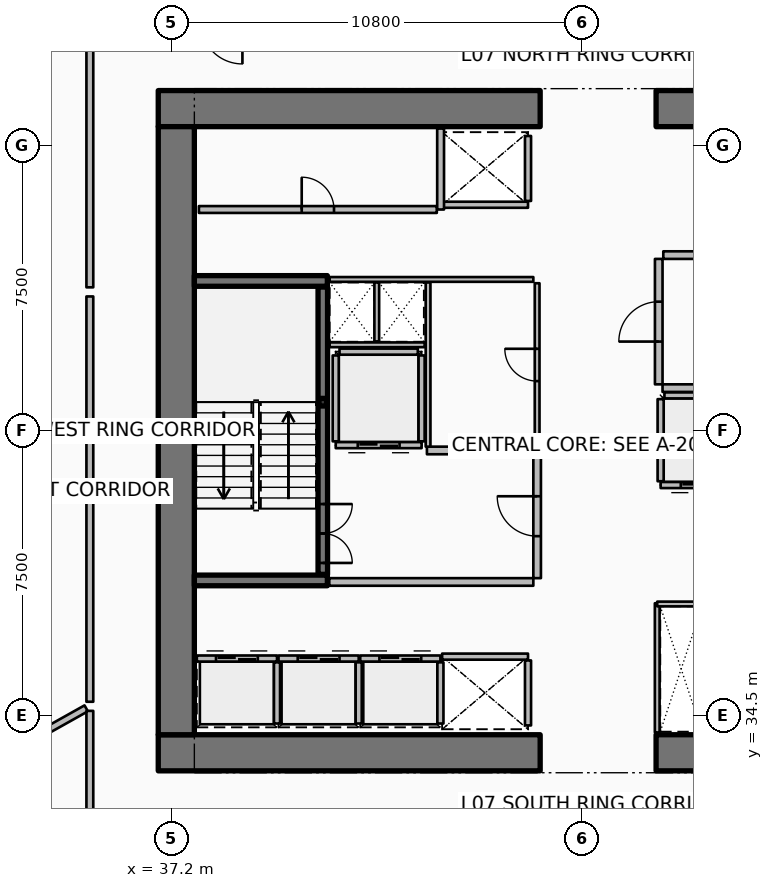
"""IFC4 building model, lengths in metres.
Left out: names, types, materials, properties, quantities, classifications, styles, units other than length and angle.
Written with IfcOpenShell. Run it as: python <this file> out.ifc"""

import sys

from ifc_helpers import new_model, si_unit, direction, frame, frame_2d, origin, origin_2d, place, context, subcontext, project, spatial, rectangle, hollow_rectangle, extrude, element, fill, save


model = new_model("IFC4")
c1 = context("Model", 3, precision=1e-05, world=origin(), true_north=direction((0.0, 1.0)))
c2 = subcontext(c1, "Body", "Model", "MODEL_VIEW")
j1 = project(units=[si_unit("LENGTHUNIT", "METRE"), si_unit("PLANEANGLEUNIT", "RADIAN")], contexts=[c1])
p1 = place(None, origin())
s1 = spatial("IfcSite", under=j1, at=p1, CompositionType="ELEMENT")
p2 = place(p1, origin())
s2 = spatial("IfcBuilding", under=s1, at=p2, CompositionType="ELEMENT")
p3 = place(p2, frame((0.0, 0.0, 33.9)))
s3 = spatial("IfcBuildingStorey", under=s2, at=p3, CompositionType="ELEMENT", Elevation=33.9)
p4 = place(p3, frame((36.85, 33.525, 0.0), z_axis=(0.0, 0.0, 1.0), x_axis=(1.0, 0.0, 0.0)))
e1 = element("IfcWall", 1, at=p4, inside=s3, PredefinedType="SHEAR", context=c2, shape_type="SweptSolid", body=[
    extrude(rectangle(XDim=10.05, YDim=0.95, at=frame_2d((5.025, 0.0))), origin(), (0.0, 0.0, 1.0), 3.75),
])
p5 = place(p3, frame((49.95, 33.525, 0.0), z_axis=(0.0, 0.0, 1.0), x_axis=(1.0, 0.0, 0.0)))
e2 = element("IfcWall", 2, at=p5, inside=s3, PredefinedType="SHEAR", context=c2, shape_type="SweptSolid", body=[
    extrude(rectangle(XDim=10.05, YDim=0.95, at=frame_2d((5.025, 0.0))), origin(), (0.0, 0.0, 1.0), 3.75),
])
p6 = place(p3, frame((36.85, 50.475, 0.0), z_axis=(0.0, 0.0, 1.0), x_axis=(1.0, 0.0, 0.0)))
e3 = element("IfcWall", 3, at=p6, inside=s3, PredefinedType="SHEAR", context=c2, shape_type="SweptSolid", body=[
    extrude(rectangle(XDim=10.05, YDim=0.95, at=frame_2d((5.025, 0.0))), origin(), (0.0, 0.0, 1.0), 3.75),
])
p7 = place(p3, frame((49.95, 50.475, 0.0), z_axis=(0.0, 0.0, 1.0), x_axis=(1.0, 0.0, 0.0)))
e4 = element("IfcWall", 4, at=p7, inside=s3, PredefinedType="SHEAR", context=c2, shape_type="SweptSolid", body=[
    extrude(rectangle(XDim=10.05, YDim=0.95, at=frame_2d((5.025, 0.0))), origin(), (0.0, 0.0, 1.0), 3.75),
])
p8 = place(p3, frame((37.325, 34.0, 0.0), z_axis=(0.0, 0.0, 1.0), x_axis=(0.0, 1.0, 0.0)))
e5 = element("IfcWall", 5, at=p8, inside=s3, PredefinedType="SHEAR", context=c2, shape_type="SweptSolid", body=[
    extrude(rectangle(XDim=16.0, YDim=0.95, at=frame_2d((8.0, 0.0))), origin(), (0.0, 0.0, 1.0), 3.75),
])
for number, where, z_axis, x_axis in (
    (6, (37.8, 38.06, 0.0), (0.0, 0.0, 1.0), (1.0, 0.0, 0.0)),
    (7, (37.8, 45.94, 0.0), (0.0, 0.0, 1.0), (1.0, 0.0, 0.0)),
):
    element("IfcWall", number, at=place(p3, frame(where, z_axis=z_axis, x_axis=x_axis)), inside=s3, PredefinedType="SHEAR", context=c2, shape_type="SweptSolid", body=[
        extrude(rectangle(XDim=3.5, YDim=0.28, at=frame_2d((1.75, 0.0))), origin(), (0.0, 0.0, 1.0), 3.75),
    ])
p9 = place(p3, frame((41.18, 42.75, 0.0), z_axis=(0.0, 0.0, 1.0), x_axis=(1.0, 0.0, 0.0)))
e8 = element("IfcColumn", 8, at=p9, inside=s3, PredefinedType="COLUMN", context=c2, shape_type="SweptSolid", body=[
    extrude(hollow_rectangle(XDim=0.2, YDim=0.2, WallThickness=0.01, InnerFilletRadius=0.01, OuterFilletRadius=0.02, at=origin_2d()), origin(), (0.0, 0.0, 1.0), 1.67),
])
p10 = place(p3, frame((41.18, 38.22, 0.0), z_axis=(0.0, 0.0, 1.0), x_axis=(0.0, 1.0, 0.0)))
e9 = element("IfcWall", 9, at=p10, inside=s3, PredefinedType="SOLIDWALL", context=c2, shape_type="SweptSolid", body=[
    extrude(rectangle(XDim=7.56, YDim=0.25, at=frame_2d((3.78, 0.0))), origin(), (0.0, 0.0, 1.0), 3.5),
])
p11 = place(p10, frame((0.3, 0.0, 0.0)))
e10 = element("IfcOpeningElement", 10, at=p11, cuts=e9, PredefinedType="OPENING", context=c2, shape_type="SweptSolid", body=[
    extrude(rectangle(XDim=1.55, YDim=2.15, at=frame_2d((0.775, 1.075))), frame((0.0, 0.135, 0.0), z_axis=(0.0, -1.0, 0.0), x_axis=(1.0, 0.0, 0.0)), (0.0, 0.0, 1.0), 0.27),
])
p12 = place(p3, frame((37.865, 36.005, 0.0), z_axis=(0.0, 0.0, 1.0), x_axis=(1.0, 0.0, 0.0)))
e11 = element("IfcWall", 11, at=p12, inside=s3, PredefinedType="PARTITIONING", context=c2, shape_type="SweptSolid", body=[
    extrude(rectangle(XDim=2.11, YDim=0.16, at=frame_2d((1.055, 0.0))), origin(), (0.0, 0.0, 1.0), 3.5),
])
p13 = place(p12, frame((0.505, 0.0, 0.0)))
e12 = element("IfcOpeningElement", 12, at=p13, cuts=e11, PredefinedType="OPENING", context=c2, shape_type="SweptSolid", body=[
    extrude(rectangle(XDim=1.1, YDim=2.1, at=frame_2d((0.55, 1.05))), frame((0.0, 0.09, 0.0), z_axis=(0.0, -1.0, 0.0), x_axis=(1.0, 0.0, 0.0)), (0.0, 0.0, 1.0), 0.18),
])
p14 = place(p3, frame((39.975, 34.295, 0.0), z_axis=(0.0, 0.0, 1.0), x_axis=(0.0, 1.0, 0.0)))
e13 = element("IfcWall", 13, at=p14, inside=s3, PredefinedType="PARTITIONING", context=c2, shape_type="SweptSolid", body=[
    extrude(rectangle(XDim=1.61, YDim=0.16, at=frame_2d((0.805, 0.0))), origin(), (0.0, 0.0, 1.0), 3.5),
])
p15 = place(p3, frame((40.015, 36.005, 0.0), z_axis=(0.0, 0.0, 1.0), x_axis=(1.0, 0.0, 0.0)))
e14 = element("IfcWall", 14, at=p15, inside=s3, PredefinedType="PARTITIONING", context=c2, shape_type="SweptSolid", body=[
    extrude(rectangle(XDim=2.11, YDim=0.16, at=frame_2d((1.055, 0.0))), origin(), (0.0, 0.0, 1.0), 3.5),
])
p16 = place(p15, frame((0.505, 0.0, 0.0)))
e15 = element("IfcOpeningElement", 15, at=p16, cuts=e14, PredefinedType="OPENING", context=c2, shape_type="SweptSolid", body=[
    extrude(rectangle(XDim=1.1, YDim=2.1, at=frame_2d((0.55, 1.05))), frame((0.0, 0.09, 0.0), z_axis=(0.0, -1.0, 0.0), x_axis=(1.0, 0.0, 0.0)), (0.0, 0.0, 1.0), 0.18),
])
p17 = place(p3, frame((42.125, 34.295, 0.0), z_axis=(0.0, 0.0, 1.0), x_axis=(0.0, 1.0, 0.0)))
e16 = element("IfcWall", 16, at=p17, inside=s3, PredefinedType="PARTITIONING", context=c2, shape_type="SweptSolid", body=[
    extrude(rectangle(XDim=1.61, YDim=0.16, at=frame_2d((0.805, 0.0))), origin(), (0.0, 0.0, 1.0), 3.5),
])
p18 = place(p3, frame((42.165, 36.005, 0.0), z_axis=(0.0, 0.0, 1.0), x_axis=(1.0, 0.0, 0.0)))
e17 = element("IfcWall", 17, at=p18, inside=s3, PredefinedType="PARTITIONING", context=c2, shape_type="SweptSolid", body=[
    extrude(rectangle(XDim=2.11, YDim=0.16, at=frame_2d((1.055, 0.0))), origin(), (0.0, 0.0, 1.0), 3.5),
])
p19 = place(p18, frame((0.505, 0.0, 0.0)))
e18 = element("IfcOpeningElement", 18, at=p19, cuts=e17, PredefinedType="OPENING", context=c2, shape_type="SweptSolid", body=[
    extrude(rectangle(XDim=1.1, YDim=2.1, at=frame_2d((0.55, 1.05))), frame((0.0, 0.09, 0.0), z_axis=(0.0, -1.0, 0.0), x_axis=(1.0, 0.0, 0.0)), (0.0, 0.0, 1.0), 0.18),
])
p20 = place(p3, frame((44.275, 34.295, 0.0), z_axis=(0.0, 0.0, 1.0), x_axis=(0.0, 1.0, 0.0)))
e19 = element("IfcWall", 19, at=p20, inside=s3, PredefinedType="PARTITIONING", context=c2, shape_type="SweptSolid", body=[
    extrude(rectangle(XDim=1.61, YDim=0.16, at=frame_2d((0.805, 0.0))), origin(), (0.0, 0.0, 1.0), 3.5),
])
p21 = place(p3, frame((46.58, 47.945, 0.0), z_axis=(0.0, 0.0, 1.0), x_axis=(-1.0, 0.0, 0.0)))
e20 = element("IfcWall", 20, at=p21, inside=s3, PredefinedType="PARTITIONING", context=c2, shape_type="SweptSolid", body=[
    extrude(rectangle(XDim=2.26, YDim=0.16, at=frame_2d((1.13, 0.0))), origin(), (0.0, 0.0, 1.0), 3.5),
])
p22 = place(p3, frame((46.58, 48.045, 0.0), z_axis=(0.0, 0.0, 1.0), x_axis=(0.0, 1.0, 0.0)))
e21 = element("IfcWall", 21, at=p22, inside=s3, PredefinedType="PARTITIONING", context=c2, shape_type="SweptSolid", body=[
    extrude(rectangle(XDim=1.71, YDim=0.16, at=frame_2d((0.855, 0.0))), origin(), (0.0, 0.0, 1.0), 3.5),
])
p23 = place(p3, frame((44.32, 36.055, 0.0), z_axis=(0.0, 0.0, 1.0), x_axis=(1.0, 0.0, 0.0)))
e22 = element("IfcWall", 22, at=p23, inside=s3, PredefinedType="PARTITIONING", context=c2, shape_type="SweptSolid", body=[
    extrude(rectangle(XDim=2.26, YDim=0.16, at=frame_2d((1.13, 0.0))), origin(), (0.0, 0.0, 1.0), 3.5),
])
p24 = place(p3, frame((46.58, 34.245, 0.0), z_axis=(0.0, 0.0, 1.0), x_axis=(0.0, 1.0, 0.0)))
e23 = element("IfcWall", 23, at=p24, inside=s3, PredefinedType="PARTITIONING", context=c2, shape_type="SweptSolid", body=[
    extrude(rectangle(XDim=1.71, YDim=0.16, at=frame_2d((0.855, 0.0))), origin(), (0.0, 0.0, 1.0), 3.5),
])
p25 = place(p3, frame((43.78, 41.62, 0.0), z_axis=(0.0, 0.0, 1.0), x_axis=(-1.0, 0.0, 0.0)))
e24 = element("IfcWall", 24, at=p25, inside=s3, PredefinedType="PARTITIONING", context=c2, shape_type="SweptSolid", body=[
    extrude(rectangle(XDim=2.26, YDim=0.16, at=frame_2d((1.13, 0.0))), origin(), (0.0, 0.0, 1.0), 3.5),
])
p26 = place(p25, frame((0.58, 0.0, 0.0)))
e25 = element("IfcOpeningElement", 25, at=p26, cuts=e24, PredefinedType="OPENING", context=c2, shape_type="SweptSolid", body=[
    extrude(rectangle(XDim=1.1, YDim=2.1, at=frame_2d((0.55, 1.05))), frame((0.0, 0.09, 0.0), z_axis=(0.0, -1.0, 0.0), x_axis=(1.0, 0.0, 0.0)), (0.0, 0.0, 1.0), 0.18),
])
for number, where, z_axis, x_axis in (
    (26, (43.78, 41.72, 0.0), (0.0, 0.0, 1.0), (0.0, 1.0, 0.0)),
    (27, (41.52, 41.72, 0.0), (0.0, 0.0, 1.0), (0.0, 1.0, 0.0)),
):
    element("IfcWall", number, at=place(p3, frame(where, z_axis=z_axis, x_axis=x_axis)), inside=s3, PredefinedType="PARTITIONING", context=c2, shape_type="SweptSolid", body=[
        extrude(rectangle(XDim=2.26, YDim=0.16, at=frame_2d((1.13, 0.0))), origin(), (0.0, 0.0, 1.0), 3.5),
    ])
p27 = place(p3, frame((41.62, 44.08, 0.0), z_axis=(0.0, 0.0, 1.0), x_axis=(1.0, 0.0, 0.0)))
e28 = element("IfcWall", 28, at=p27, inside=s3, PredefinedType="PARTITIONING", context=c2, shape_type="SweptSolid", body=[
    extrude(rectangle(XDim=2.06, YDim=0.16, at=frame_2d((1.03, 0.0))), origin(), (0.0, 0.0, 1.0), 3.5),
])
p28 = place(p3, frame((52.23, 40.57, 0.0), z_axis=(0.0, 0.0, 1.0), x_axis=(-1.0, 0.0, 0.0)))
e29 = element("IfcWall", 29, at=p28, inside=s3, PredefinedType="PARTITIONING", context=c2, shape_type="SweptSolid", body=[
    extrude(rectangle(XDim=2.16, YDim=0.16, at=frame_2d((1.08, 0.0))), origin(), (0.0, 0.0, 1.0), 3.5),
])
p29 = place(p28, frame((0.53, 0.0, 0.0)))
e30 = element("IfcOpeningElement", 30, at=p29, cuts=e29, PredefinedType="OPENING", context=c2, shape_type="SweptSolid", body=[
    extrude(rectangle(XDim=1.1, YDim=2.1, at=frame_2d((0.55, 1.05))), frame((0.0, 0.09, 0.0), z_axis=(0.0, -1.0, 0.0), x_axis=(1.0, 0.0, 0.0)), (0.0, 0.0, 1.0), 0.18),
])
p30 = place(p3, frame((50.07, 40.67, 0.0), z_axis=(0.0, 0.0, 1.0), x_axis=(0.0, 1.0, 0.0)))
e31 = element("IfcWall", 31, at=p30, inside=s3, PredefinedType="PARTITIONING", context=c2, shape_type="SweptSolid", body=[
    extrude(rectangle(XDim=2.16, YDim=0.16, at=frame_2d((1.08, 0.0))), origin(), (0.0, 0.0, 1.0), 3.5),
])
p31 = place(p3, frame((50.17, 42.93, 0.0), z_axis=(0.0, 0.0, 1.0), x_axis=(1.0, 0.0, 0.0)))
e32 = element("IfcWall", 32, at=p31, inside=s3, PredefinedType="PARTITIONING", context=c2, shape_type="SweptSolid", body=[
    extrude(rectangle(XDim=1.96, YDim=0.16, at=frame_2d((0.98, 0.0))), origin(), (0.0, 0.0, 1.0), 3.5),
])
p32 = place(p3, frame((37.92, 47.82, 0.0), z_axis=(0.0, 0.0, 1.0), x_axis=(1.0, 0.0, 0.0)))
e33 = element("IfcWall", 33, at=p32, inside=s3, PredefinedType="PARTITIONING", context=c2, shape_type="SweptSolid", body=[
    extrude(rectangle(XDim=6.26, YDim=0.18, at=frame_2d((3.13, 0.0))), origin(), (0.0, 0.0, 1.0), 3.5),
])
p33 = place(p32, frame((2.705, 0.0, 0.0)))
e34 = element("IfcOpeningElement", 34, at=p33, cuts=e33, PredefinedType="OPENING", context=c2, shape_type="SweptSolid", body=[
    extrude(rectangle(XDim=0.85, YDim=2.06, at=frame_2d((0.425, 1.03))), frame((0.0, 0.1, 0.0), z_axis=(0.0, -1.0, 0.0), x_axis=(1.0, 0.0, 0.0)), (0.0, 0.0, 1.0), 0.2),
])
p34 = place(p3, frame((44.28, 47.82, 0.0), z_axis=(0.0, 0.0, 1.0), x_axis=(0.0, 1.0, 0.0)))
e35 = element("IfcWall", 35, at=p34, inside=s3, PredefinedType="PARTITIONING", context=c2, shape_type="SweptSolid", body=[
    extrude(rectangle(XDim=2.13, YDim=0.18, at=frame_2d((1.065, 0.0))), origin(), (0.0, 0.0, 1.0), 3.5),
])
p35 = place(p3, frame((41.35, 38.02, 0.0), z_axis=(0.0, 0.0, 1.0), x_axis=(1.0, 0.0, 0.0)))
e36 = element("IfcWall", 36, at=p35, inside=s3, PredefinedType="PARTITIONING", context=c2, shape_type="SweptSolid", body=[
    extrude(rectangle(XDim=5.37, YDim=0.2, at=frame_2d((2.685, 0.0))), origin(), (0.0, 0.0, 1.0), 3.5),
])
p36 = place(p3, frame((43.92, 41.48, 0.0), z_axis=(0.0, 0.0, 1.0), x_axis=(1.0, 0.0, 0.0)))
e37 = element("IfcWall", 37, at=p36, inside=s3, PredefinedType="PARTITIONING", context=c2, shape_type="SweptSolid", body=[
    extrude(rectangle(XDim=2.8, YDim=0.2, at=frame_2d((1.4, 0.0))), origin(), (0.0, 0.0, 1.0), 3.5),
])
p37 = place(p3, frame((46.82, 38.12, 0.0), z_axis=(0.0, 0.0, 1.0), x_axis=(0.0, 1.0, 0.0)))
e38 = element("IfcWall", 38, at=p37, inside=s3, PredefinedType="PARTITIONING", context=c2, shape_type="SweptSolid", body=[
    extrude(rectangle(XDim=3.26, YDim=0.2, at=frame_2d((1.63, 0.0))), origin(), (0.0, 0.0, 1.0), 3.5),
])
p38 = place(p37, frame((1.105, 0.0, 0.0)))
e39 = element("IfcOpeningElement", 39, at=p38, cuts=e38, PredefinedType="OPENING", context=c2, shape_type="SweptSolid", body=[
    extrude(rectangle(XDim=1.05, YDim=2.1, at=frame_2d((0.525, 1.05))), frame((0.0, 0.11, 0.0), z_axis=(0.0, -1.0, 0.0), x_axis=(1.0, 0.0, 0.0)), (0.0, 0.0, 1.0), 0.22),
])
p39 = place(p3, frame((50.12, 43.12, 0.0), z_axis=(0.0, 0.0, 1.0), x_axis=(1.0, 0.0, 0.0)))
e40 = element("IfcWall", 40, at=p39, inside=s3, PredefinedType="PARTITIONING", context=c2, shape_type="SweptSolid", body=[
    extrude(rectangle(XDim=8.88, YDim=0.2, at=frame_2d((4.44, 0.0))), origin(), (0.0, 0.0, 1.0), 3.5),
])
p40 = place(p3, frame((50.14, 46.62, 0.0), z_axis=(0.0, 0.0, 1.0), x_axis=(1.0, 0.0, 0.0)))
e41 = element("IfcWall", 41, at=p40, inside=s3, PredefinedType="PARTITIONING", context=c2, shape_type="SweptSolid", body=[
    extrude(rectangle(XDim=1.02, YDim=0.2, at=frame_2d((0.51, 0.0))), origin(), (0.0, 0.0, 1.0), 3.5),
])
p41 = place(p3, frame((50.02, 43.22, 0.0), z_axis=(0.0, 0.0, 1.0), x_axis=(0.0, 1.0, 0.0)))
e42 = element("IfcWall", 42, at=p41, inside=s3, PredefinedType="PARTITIONING", context=c2, shape_type="SweptSolid", body=[
    extrude(rectangle(XDim=3.3, YDim=0.2, at=frame_2d((1.65, 0.0))), origin(), (0.0, 0.0, 1.0), 3.5),
])
p42 = place(p41, frame((1.125, 0.0, 0.0)))
e43 = element("IfcOpeningElement", 43, at=p42, cuts=e42, PredefinedType="OPENING", context=c2, shape_type="SweptSolid", body=[
    extrude(rectangle(XDim=1.05, YDim=2.1, at=frame_2d((0.525, 1.05))), frame((0.0, 0.11, 0.0), z_axis=(0.0, -1.0, 0.0), x_axis=(1.0, 0.0, 0.0)), (0.0, 0.0, 1.0), 0.22),
])
p43 = place(p3, frame((41.36, 45.98, 0.0), z_axis=(0.0, 0.0, 1.0), x_axis=(1.0, 0.0, 0.0)))
e44 = element("IfcWall", 44, at=p43, inside=s3, PredefinedType="PARTITIONING", context=c2, shape_type="SweptSolid", body=[
    extrude(rectangle(XDim=5.36, YDim=0.125, at=frame_2d((2.68, 0.0))), origin(), (0.0, 0.0, 1.0), 2.94),
])
p44 = place(p3, frame((41.36, 44.26, 0.0), z_axis=(0.0, 0.0, 1.0), x_axis=(1.0, 0.0, 0.0)))
e45 = element("IfcWall", 45, at=p44, inside=s3, PredefinedType="PARTITIONING", context=c2, shape_type="SweptSolid", body=[
    extrude(rectangle(XDim=2.5, YDim=0.125, at=frame_2d((1.25, 0.0))), origin(), (0.0, 0.0, 1.0), 2.94),
])
p45 = place(p3, frame((42.6, 44.35, 0.0), z_axis=(0.0, 0.0, 1.0), x_axis=(0.0, 1.0, 0.0)))
e46 = element("IfcWall", 46, at=p45, inside=s3, PredefinedType="PARTITIONING", context=c2, shape_type="SweptSolid", body=[
    extrude(rectangle(XDim=1.55, YDim=0.125, at=frame_2d((0.775, 0.0))), origin(), (0.0, 0.0, 1.0), 2.94),
])
p46 = place(p3, frame((49.98, 34.06, 0.0), z_axis=(0.0, 0.0, 1.0), x_axis=(0.0, 1.0, 0.0)))
e47 = element("IfcWall", 47, at=p46, inside=s3, PredefinedType="PARTITIONING", context=c2, shape_type="SweptSolid", body=[
    extrude(rectangle(XDim=3.4, YDim=0.125, at=frame_2d((1.7, 0.0))), origin(), (0.0, 0.0, 1.0), 2.94),
])
p47 = place(p3, frame((49.98, 37.44, 0.0), z_axis=(0.0, 0.0, 1.0), x_axis=(1.0, 0.0, 0.0)))
e48 = element("IfcWall", 48, at=p47, inside=s3, PredefinedType="PARTITIONING", context=c2, shape_type="SweptSolid", body=[
    extrude(rectangle(XDim=1.26, YDim=0.125, at=frame_2d((0.63, 0.0))), origin(), (0.0, 0.0, 1.0), 2.94),
])
p48 = place(p3, frame((43.95, 41.58, 0.0), z_axis=(0.0, 0.0, 1.0), x_axis=(0.0, 1.0, 0.0)))
e49 = element("IfcWall", 49, at=p48, inside=s3, PredefinedType="PARTITIONING", context=c2, shape_type="SweptSolid", body=[
    extrude(rectangle(XDim=4.32, YDim=0.125, at=frame_2d((2.16, 0.0))), origin(), (0.0, 0.0, 1.0), 2.94),
])
p49 = place(p3, frame((46.82, 41.58, 0.0), z_axis=(0.0, 0.0, 1.0), x_axis=(0.0, 1.0, 0.0)))
e50 = element("IfcWall", 50, at=p49, inside=s3, PredefinedType="PARTITIONING", context=c2, shape_type="SweptSolid", body=[
    extrude(rectangle(XDim=4.3, YDim=0.125, at=frame_2d((2.15, 0.0))), origin(), (0.0, 0.0, 1.0), 2.94),
])
p50 = place(p49, frame((1.725, 0.0, 0.0)))
e51 = element("IfcOpeningElement", 51, at=p50, cuts=e50, PredefinedType="OPENING", context=c2, shape_type="SweptSolid", body=[
    extrude(rectangle(XDim=0.85, YDim=2.06, at=frame_2d((0.425, 1.03))), frame((0.0, 0.073, 0.0), z_axis=(0.0, -1.0, 0.0), x_axis=(1.0, 0.0, 0.0)), (0.0, 0.0, 1.0), 0.145),
])
p51 = place(p3, frame((34.954, 34.694, 0.0), z_axis=(0.0, 0.0, 1.0), x_axis=(-0.872493465611, -0.488625779577, 0.0)))
e52 = element("IfcWall", 52, at=p51, inside=s3, PredefinedType="PARTITIONING", context=c2, shape_type="SweptSolid", body=[
    extrude(rectangle(XDim=16.586, YDim=0.18, at=frame_2d((8.293, 0.0))), origin(), (0.0, 0.0, 1.0), 2.867),
])
p52 = place(p3, frame((35.05, 52.089, 0.0), z_axis=(0.0, 0.0, 1.0), x_axis=(0.0, -1.0, 0.0)))
e53 = element("IfcWall", 53, at=p52, inside=s3, PredefinedType="PARTITIONING", context=c2, shape_type="SweptSolid", body=[
    extrude(rectangle(XDim=6.317, YDim=0.18, at=frame_2d((3.158, 0.0))), origin(), (0.0, 0.0, 1.0), 2.867),
])
p53 = place(p3, frame((35.05, 45.532, 0.0), z_axis=(0.0, 0.0, 1.0), x_axis=(0.0, -1.0, 0.0)))
e54 = element("IfcWall", 54, at=p53, inside=s3, PredefinedType="PARTITIONING", context=c2, shape_type="SweptSolid", body=[
    extrude(rectangle(XDim=4.945, YDim=0.18, at=frame_2d((2.472, 0.0))), origin(), (0.0, 0.0, 1.0), 2.867),
])
p54 = place(p3, frame((35.05, 40.347, 0.0), z_axis=(0.0, 0.0, 1.0), x_axis=(0.0, -1.0, 0.0)))
e55 = element("IfcWall", 55, at=p54, inside=s3, PredefinedType="PARTITIONING", context=c2, shape_type="SweptSolid", body=[
    extrude(rectangle(XDim=5.48, YDim=0.18, at=frame_2d((2.74, 0.0))), origin(), (0.0, 0.0, 1.0), 2.867),
])
p55 = place(p3, frame((35.05, 34.628, 0.0), z_axis=(0.0, 0.0, 1.0), x_axis=(0.0, -1.0, 0.0)))
e56 = element("IfcWall", 56, at=p55, inside=s3, PredefinedType="PARTITIONING", context=c2, shape_type="SweptSolid", body=[
    extrude(rectangle(XDim=3.258, YDim=0.18, at=frame_2d((1.629, 0.0))), origin(), (0.0, 0.0, 1.0), 2.867),
])
p56 = place(p11, origin())
e57 = element("IfcDoor", 57, at=p56, inside=s3, OperationType="DOUBLE_DOOR_SINGLE_SWING", PredefinedType="DOOR", context=c2, shape_type="SweptSolid", body=[
    extrude(rectangle(XDim=1.55, YDim=2.15, at=frame_2d((0.775, 1.075))), frame((0.0, 0.025, 0.0), z_axis=(0.0, -1.0, 0.0), x_axis=(1.0, 0.0, 0.0)), (0.0, 0.0, 1.0), 0.05),
])
fill(e10, e57)
p57 = place(p13, origin())
e58 = element("IfcDoor", 58, at=p57, inside=s3, OperationType="DOUBLE_DOOR_SLIDING", PredefinedType="DOOR", context=c2, shape_type="SweptSolid", body=[
    extrude(rectangle(XDim=1.1, YDim=2.1, at=frame_2d((0.55, 1.05))), frame((0.0, 0.025, 0.0), z_axis=(0.0, -1.0, 0.0), x_axis=(1.0, 0.0, 0.0)), (0.0, 0.0, 1.0), 0.05),
])
fill(e12, e58)
p58 = place(p16, origin())
e59 = element("IfcDoor", 59, at=p58, inside=s3, OperationType="DOUBLE_DOOR_SLIDING", PredefinedType="DOOR", context=c2, shape_type="SweptSolid", body=[
    extrude(rectangle(XDim=1.1, YDim=2.1, at=frame_2d((0.55, 1.05))), frame((0.0, 0.025, 0.0), z_axis=(0.0, -1.0, 0.0), x_axis=(1.0, 0.0, 0.0)), (0.0, 0.0, 1.0), 0.05),
])
fill(e15, e59)
p59 = place(p19, origin())
e60 = element("IfcDoor", 60, at=p59, inside=s3, OperationType="DOUBLE_DOOR_SLIDING", PredefinedType="DOOR", context=c2, shape_type="SweptSolid", body=[
    extrude(rectangle(XDim=1.1, YDim=2.1, at=frame_2d((0.55, 1.05))), frame((0.0, 0.025, 0.0), z_axis=(0.0, -1.0, 0.0), x_axis=(1.0, 0.0, 0.0)), (0.0, 0.0, 1.0), 0.05),
])
fill(e18, e60)
p60 = place(p26, origin())
e61 = element("IfcDoor", 61, at=p60, inside=s3, OperationType="DOUBLE_DOOR_SLIDING", PredefinedType="DOOR", context=c2, shape_type="SweptSolid", body=[
    extrude(rectangle(XDim=1.1, YDim=2.1, at=frame_2d((0.55, 1.05))), frame((0.0, 0.025, 0.0), z_axis=(0.0, -1.0, 0.0), x_axis=(1.0, 0.0, 0.0)), (0.0, 0.0, 1.0), 0.05),
])
fill(e25, e61)
p61 = place(p29, origin())
e62 = element("IfcDoor", 62, at=p61, inside=s3, OperationType="DOUBLE_DOOR_SLIDING", PredefinedType="DOOR", context=c2, shape_type="SweptSolid", body=[
    extrude(rectangle(XDim=1.1, YDim=2.1, at=frame_2d((0.55, 1.05))), frame((0.0, 0.025, 0.0), z_axis=(0.0, -1.0, 0.0), x_axis=(1.0, 0.0, 0.0)), (0.0, 0.0, 1.0), 0.05),
])
fill(e30, e62)
p62 = place(p33, origin())
e63 = element("IfcDoor", 63, at=p62, inside=s3, OperationType="SINGLE_SWING_LEFT", PredefinedType="DOOR", context=c2, shape_type="SweptSolid", body=[
    extrude(rectangle(XDim=0.85, YDim=2.06, at=frame_2d((0.425, 1.03))), frame((0.0, 0.025, 0.0), z_axis=(0.0, -1.0, 0.0), x_axis=(1.0, 0.0, 0.0)), (0.0, 0.0, 1.0), 0.05),
])
fill(e34, e63)
p63 = place(p38, origin())
e64 = element("IfcDoor", 64, at=p63, inside=s3, OperationType="SINGLE_SWING_RIGHT", PredefinedType="DOOR", context=c2, shape_type="SweptSolid", body=[
    extrude(rectangle(XDim=1.05, YDim=2.1, at=frame_2d((0.525, 1.05))), frame((0.0, 0.025, 0.0), z_axis=(0.0, -1.0, 0.0), x_axis=(1.0, 0.0, 0.0)), (0.0, 0.0, 1.0), 0.05),
])
fill(e39, e64)
p64 = place(p42, origin())
e65 = element("IfcDoor", 65, at=p64, inside=s3, OperationType="SINGLE_SWING_LEFT", PredefinedType="DOOR", context=c2, shape_type="SweptSolid", body=[
    extrude(rectangle(XDim=1.05, YDim=2.1, at=frame_2d((0.525, 1.05))), frame((0.0, 0.025, 0.0), z_axis=(0.0, -1.0, 0.0), x_axis=(1.0, 0.0, 0.0)), (0.0, 0.0, 1.0), 0.05),
])
fill(e43, e65)
p65 = place(p50, origin())
e66 = element("IfcDoor", 66, at=p65, inside=s3, OperationType="SINGLE_SWING_RIGHT", PredefinedType="DOOR", context=c2, shape_type="SweptSolid", body=[
    extrude(rectangle(XDim=0.85, YDim=2.06, at=frame_2d((0.425, 1.03))), frame((0.0, 0.025, 0.0), z_axis=(0.0, -1.0, 0.0), x_axis=(1.0, 0.0, 0.0)), (0.0, 0.0, 1.0), 0.05),
])
fill(e51, e66)
save(model, sys.argv[1])
